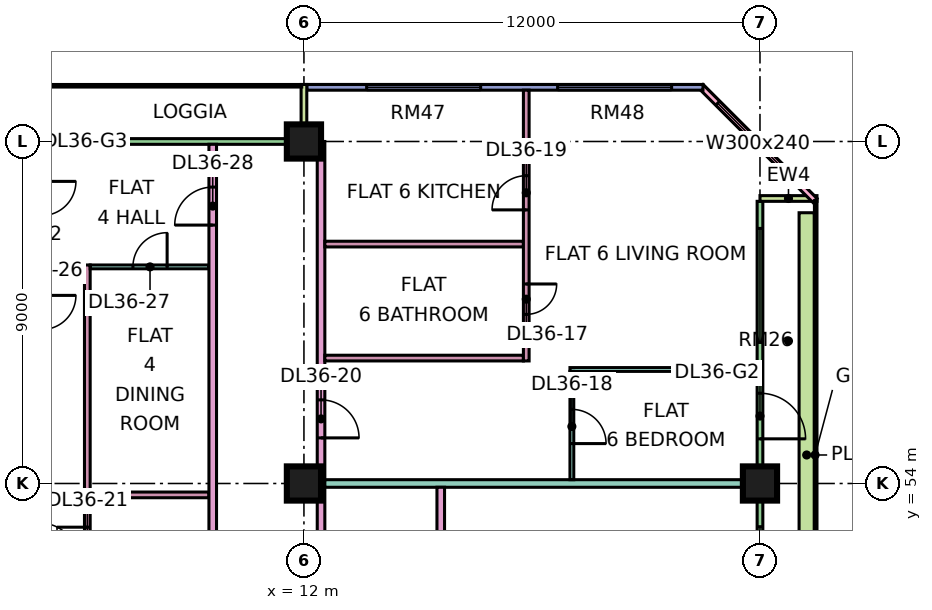
"""IFC4 building model, lengths in metres.
Left out: names, types, materials, properties, quantities, classifications, styles, units other than length and angle.
Written with IfcOpenShell. Run it as: python <this file> out.ifc"""

import sys

from ifc_helpers import new_model, si_unit, direction, frame, frame_2d, origin, origin_2d, place, context, subcontext, project, spatial, rectangle, extrude, element, fill, save


model = new_model("IFC4")
c1 = context("Model", 3, precision=1e-05, world=origin(), true_north=direction((0.0, 1.0)))
c2 = subcontext(c1, "Body", "Model", "MODEL_VIEW")
j1 = project(units=[si_unit("LENGTHUNIT", "METRE"), si_unit("PLANEANGLEUNIT", "RADIAN")], contexts=[c1])
p1 = place(None, origin())
s1 = spatial("IfcSite", under=j1, at=p1, CompositionType="ELEMENT")
p2 = place(p1, origin())
s2 = spatial("IfcBuilding", under=s1, at=p2, CompositionType="ELEMENT")
p3 = place(p2, frame((0.0, 0.0, 161.15)))
s3 = spatial("IfcBuildingStorey", under=s2, at=p3, CompositionType="ELEMENT", Elevation=161.15)
for number, where, z_axis, x_axis in (
    (1, (12.0, 54.0, 0.0), (0.0, 0.0, 1.0), (1.0, 0.0, 0.0)),
    (2, (12.0, 63.0, 0.0), (0.0, 0.0, 1.0), (1.0, 0.0, 0.0)),
    (3, (24.0, 54.0, 0.0), (0.0, 0.0, 1.0), (1.0, 0.0, 0.0)),
):
    element("IfcColumn", number, at=place(p3, frame(where, z_axis=z_axis, x_axis=x_axis)), inside=s3, PredefinedType="COLUMN", context=c2, shape_type="SweptSolid", body=[
        extrude(rectangle(XDim=0.9, YDim=0.9, at=origin_2d()), origin(), (0.0, 0.0, 1.0), 3.75),
    ])
p4 = place(p3, frame((24.0, 48.075, 0.0), z_axis=(0.0, 0.0, 1.0), x_axis=(0.0, 1.0, 0.0)))
e4 = element("IfcWall", 4, at=p4, inside=s3, PredefinedType="SOLIDWALL", context=c2, shape_type="SweptSolid", body=[
    extrude(rectangle(XDim=13.35, YDim=0.15, at=frame_2d((6.675, 0.0))), origin(), (0.0, 0.0, 1.0), 3.35),
])
p5 = place(p4, frame((0.587, 0.0, 0.45)))
e5 = element("IfcOpeningElement", 5, at=p5, cuts=e4, PredefinedType="OPENING", context=c2, shape_type="SweptSolid", body=[
    extrude(rectangle(XDim=4.2, YDim=2.4, at=frame_2d((2.1, 1.2))), frame((0.0, 0.085, 0.0), z_axis=(0.0, -1.0, 0.0), x_axis=(1.0, 0.0, 0.0)), (0.0, 0.0, 1.0), 0.17),
])
p6 = place(p4, frame((7.1, 0.0, 0.0)))
e6 = element("IfcOpeningElement", 6, at=p6, cuts=e4, PredefinedType="OPENING", context=c2, shape_type="SweptSolid", body=[
    extrude(rectangle(XDim=1.2, YDim=2.4, at=frame_2d((0.6, 1.2))), frame((0.0, 0.085, 0.0), z_axis=(0.0, -1.0, 0.0), x_axis=(1.0, 0.0, 0.0)), (0.0, 0.0, 1.0), 0.17),
])
p7 = place(p4, frame((9.637, 0.0, 0.45)))
e7 = element("IfcOpeningElement", 7, at=p7, cuts=e4, PredefinedType="OPENING", context=c2, shape_type="SweptSolid", body=[
    extrude(rectangle(XDim=3.0, YDim=2.4, at=frame_2d((1.5, 1.2))), frame((0.0, 0.085, 0.0), z_axis=(0.0, -1.0, 0.0), x_axis=(1.0, 0.0, 0.0)), (0.0, 0.0, 1.0), 0.17),
])
p8 = place(p3, frame((25.5, 61.5, 0.0), z_axis=(0.0, 0.0, 1.0), x_axis=(-1.0, 0.0, 0.0)))
e8 = element("IfcWall", 8, at=p8, inside=s3, PredefinedType="SOLIDWALL", context=c2, shape_type="SweptSolid", body=[
    extrude(rectangle(XDim=1.5, YDim=0.15, at=frame_2d((0.75, 0.0))), origin(), (0.0, 0.0, 1.0), 3.35),
])
p9 = place(p3, frame((25.447, 61.447, 0.0), z_axis=(0.0, 0.0, 1.0), x_axis=(-0.707106781187, 0.707106781187, 0.0)))
e9 = element("IfcWall", 9, at=p9, inside=s3, PredefinedType="SOLIDWALL", context=c2, shape_type="SweptSolid", body=[
    extrude(rectangle(XDim=4.243, YDim=0.15, at=frame_2d((2.121, 0.0))), origin(), (0.0, 0.0, 1.0), 3.35),
])
p10 = place(p9, frame((0.621, 0.0, 0.45)))
e10 = element("IfcOpeningElement", 10, at=p10, cuts=e9, PredefinedType="OPENING", context=c2, shape_type="SweptSolid", body=[
    extrude(rectangle(XDim=3.0, YDim=2.4, at=frame_2d((1.5, 1.2))), frame((0.0, 0.085, 0.0), z_axis=(0.0, -1.0, 0.0), x_axis=(1.0, 0.0, 0.0)), (0.0, 0.0, 1.0), 0.17),
])
p11 = place(p3, frame((22.5, 64.425, 0.0), z_axis=(0.0, 0.0, 1.0), x_axis=(-1.0, 0.0, 0.0)))
e11 = element("IfcWall", 11, at=p11, inside=s3, PredefinedType="SOLIDWALL", context=c2, shape_type="SweptSolid", body=[
    extrude(rectangle(XDim=10.425, YDim=0.15, at=frame_2d((5.212, 0.0))), origin(), (0.0, 0.0, 1.0), 3.35),
])
p12 = place(p11, frame((0.825, 0.0, 0.45)))
e12 = element("IfcOpeningElement", 12, at=p12, cuts=e11, PredefinedType="OPENING", context=c2, shape_type="SweptSolid", body=[
    extrude(rectangle(XDim=3.0, YDim=2.4, at=frame_2d((1.5, 1.2))), frame((0.0, 0.085, 0.0), z_axis=(0.0, -1.0, 0.0), x_axis=(1.0, 0.0, 0.0)), (0.0, 0.0, 1.0), 0.17),
])
p13 = place(p11, frame((5.85, 0.0, 0.45)))
e13 = element("IfcOpeningElement", 13, at=p13, cuts=e11, PredefinedType="OPENING", context=c2, shape_type="SweptSolid", body=[
    extrude(rectangle(XDim=3.0, YDim=2.4, at=frame_2d((1.5, 1.2))), frame((0.0, 0.085, 0.0), z_axis=(0.0, -1.0, 0.0), x_axis=(1.0, 0.0, 0.0)), (0.0, 0.0, 1.0), 0.17),
])
p14 = place(p3, frame((11.925, 63.0, 0.0), z_axis=(0.0, 0.0, 1.0), x_axis=(-1.0, 0.0, 0.0)))
e14 = element("IfcWall", 14, at=p14, inside=s3, PredefinedType="SOLIDWALL", context=c2, shape_type="SweptSolid", body=[
    extrude(rectangle(XDim=10.35, YDim=0.15, at=frame_2d((5.175, 0.0))), origin(), (0.0, 0.0, 1.0), 3.35),
])
p15 = place(p14, frame((7.688, 0.0, 0.0)))
e15 = element("IfcOpeningElement", 15, at=p15, cuts=e14, PredefinedType="OPENING", context=c2, shape_type="SweptSolid", body=[
    extrude(rectangle(XDim=1.8, YDim=2.4, at=frame_2d((0.9, 1.2))), frame((0.0, 0.085, 0.0), z_axis=(0.0, -1.0, 0.0), x_axis=(1.0, 0.0, 0.0)), (0.0, 0.0, 1.0), 0.17),
])
p16 = place(p3, frame((12.0, 64.5, 0.0), z_axis=(0.0, 0.0, 1.0), x_axis=(0.0, -1.0, 0.0)))
e16 = element("IfcWall", 16, at=p16, inside=s3, PredefinedType="SOLIDWALL", context=c2, shape_type="SweptSolid", body=[
    extrude(rectangle(XDim=1.5, YDim=0.15, at=frame_2d((0.75, 0.0))), origin(), (0.0, 0.0, 1.0), 3.35),
])
p17 = place(p3, frame((25.229, 48.375, 0.0), z_axis=(0.0, 0.0, 1.0), x_axis=(0.0, 1.0, 0.0)))
e17 = element("IfcWall", 17, at=p17, inside=s3, PredefinedType="SOLIDWALL", context=c2, shape_type="SweptSolid", body=[
    extrude(rectangle(XDim=12.75, YDim=0.4, at=frame_2d((6.375, 0.0))), origin(), (0.0, 0.0, 1.0), 0.7),
])
p18 = place(p3, frame((6.3, 36.1, 0.0), z_axis=(0.0, 0.0, 1.0), x_axis=(0.0, 1.0, 0.0)))
e18 = element("IfcWall", 18, at=p18, inside=s3, PredefinedType="PARTITIONING", context=c2, shape_type="SweptSolid", body=[
    extrude(rectangle(XDim=23.65, YDim=0.15, at=frame_2d((11.825, 0.0))), origin(), (0.0, 0.0, 1.0), 3.35),
])
p19 = place(p18, frame((15.95, 0.0, 0.0)))
e19 = element("IfcOpeningElement", 19, at=p19, cuts=e18, PredefinedType="OPENING", context=c2, shape_type="SweptSolid", body=[
    extrude(rectangle(XDim=0.8, YDim=2.1, at=frame_2d((0.4, 1.05))), frame((0.0, 0.085, 0.0), z_axis=(0.0, -1.0, 0.0), x_axis=(1.0, 0.0, 0.0)), (0.0, 0.0, 1.0), 0.17),
])
p20 = place(p18, frame((5.75, 0.0, 0.0)))
e20 = element("IfcOpeningElement", 20, at=p20, cuts=e18, PredefinedType="OPENING", context=c2, shape_type="SweptSolid", body=[
    extrude(rectangle(XDim=0.9, YDim=2.1, at=frame_2d((0.45, 1.05))), frame((0.0, 0.085, 0.0), z_axis=(0.0, -1.0, 0.0), x_axis=(1.0, 0.0, 0.0)), (0.0, 0.0, 1.0), 0.17),
])
p21 = place(p18, frame((0.95, 0.0, 0.0)))
e21 = element("IfcOpeningElement", 21, at=p21, cuts=e18, PredefinedType="OPENING", context=c2, shape_type="SweptSolid", body=[
    extrude(rectangle(XDim=0.8, YDim=2.1, at=frame_2d((0.4, 1.05))), frame((0.0, 0.085, 0.0), z_axis=(0.0, -1.0, 0.0), x_axis=(1.0, 0.0, 0.0)), (0.0, 0.0, 1.0), 0.17),
])
p22 = place(p18, frame((10.55, 0.0, 0.0)))
e22 = element("IfcOpeningElement", 22, at=p22, cuts=e18, PredefinedType="OPENING", context=c2, shape_type="SweptSolid", body=[
    extrude(rectangle(XDim=0.8, YDim=2.1, at=frame_2d((0.4, 1.05))), frame((0.0, 0.085, 0.0), z_axis=(0.0, -1.0, 0.0), x_axis=(1.0, 0.0, 0.0)), (0.0, 0.0, 1.0), 0.17),
])
p23 = place(p18, frame((13.4, 0.0, 0.0)))
e23 = element("IfcOpeningElement", 23, at=p23, cuts=e18, PredefinedType="OPENING", context=c2, shape_type="SweptSolid", body=[
    extrude(rectangle(XDim=0.8, YDim=2.1, at=frame_2d((0.4, 1.05))), frame((0.0, 0.085, 0.0), z_axis=(0.0, -1.0, 0.0), x_axis=(1.0, 0.0, 0.0)), (0.0, 0.0, 1.0), 0.17),
])
p24 = place(p3, frame((6.375, 53.7, 0.0), z_axis=(0.0, 0.0, 1.0), x_axis=(1.0, 0.0, 0.0)))
e24 = element("IfcWall", 24, at=p24, inside=s3, PredefinedType="PARTITIONING", context=c2, shape_type="SweptSolid", body=[
    extrude(rectangle(XDim=3.125, YDim=0.15, at=frame_2d((1.562, 0.0))), origin(), (0.0, 0.0, 1.0), 3.35),
])
p25 = place(p3, frame((6.375, 59.7, 0.0), z_axis=(0.0, 0.0, 1.0), x_axis=(1.0, 0.0, 0.0)))
e25 = element("IfcWall", 25, at=p25, inside=s3, PredefinedType="PARTITIONING", context=c2, shape_type="SweptSolid", body=[
    extrude(rectangle(XDim=3.125, YDim=0.1, at=frame_2d((1.562, 0.0))), origin(), (0.0, 0.0, 1.0), 3.35),
])
p26 = place(p25, frame((1.125, 0.0, 0.0)))
e26 = element("IfcOpeningElement", 26, at=p26, cuts=e25, PredefinedType="OPENING", context=c2, shape_type="SweptSolid", body=[
    extrude(rectangle(XDim=0.9, YDim=2.1, at=frame_2d((0.45, 1.05))), frame((0.0, 0.06, 0.0), z_axis=(0.0, -1.0, 0.0), x_axis=(1.0, 0.0, 0.0)), (0.0, 0.0, 1.0), 0.12),
])
p27 = place(p3, frame((9.6, 20.0, 0.0), z_axis=(0.0, 0.0, 1.0), x_axis=(0.0, 1.0, 0.0)))
e27 = element("IfcWall", 27, at=p27, inside=s3, PredefinedType="PARTITIONING", context=c2, shape_type="SweptSolid", body=[
    extrude(rectangle(XDim=42.926, YDim=0.2, at=frame_2d((21.463, 0.0))), origin(), (0.0, 0.0, 1.0), 3.35),
])
p28 = place(p27, frame((40.8, 0.0, 0.0)))
e28 = element("IfcOpeningElement", 28, at=p28, cuts=e27, PredefinedType="OPENING", context=c2, shape_type="SweptSolid", body=[
    extrude(rectangle(XDim=1.0, YDim=2.1, at=frame_2d((0.5, 1.05))), frame((0.0, 0.11, 0.0), z_axis=(0.0, -1.0, 0.0), x_axis=(1.0, 0.0, 0.0)), (0.0, 0.0, 1.0), 0.22),
])
p29 = place(p27, frame((0.6, 0.0, 0.0)))
e29 = element("IfcOpeningElement", 29, at=p29, cuts=e27, PredefinedType="OPENING", context=c2, shape_type="SweptSolid", body=[
    extrude(rectangle(XDim=1.2, YDim=2.1, at=frame_2d((0.6, 1.05))), frame((0.0, 0.11, 0.0), z_axis=(0.0, -1.0, 0.0), x_axis=(1.0, 0.0, 0.0)), (0.0, 0.0, 1.0), 0.22),
])
p30 = place(p27, frame((3.9, 0.0, 0.0)))
e30 = element("IfcOpeningElement", 30, at=p30, cuts=e27, PredefinedType="OPENING", context=c2, shape_type="SweptSolid", body=[
    extrude(rectangle(XDim=1.0, YDim=2.1, at=frame_2d((0.5, 1.05))), frame((0.0, 0.11, 0.0), z_axis=(0.0, -1.0, 0.0), x_axis=(1.0, 0.0, 0.0)), (0.0, 0.0, 1.0), 0.22),
])
p31 = place(p3, frame((12.45, 20.0, 0.0), z_axis=(0.0, 0.0, 1.0), x_axis=(0.0, 1.0, 0.0)))
e31 = element("IfcWall", 31, at=p31, inside=s3, PredefinedType="PARTITIONING", context=c2, shape_type="SweptSolid", body=[
    extrude(rectangle(XDim=43.0, YDim=0.2, at=frame_2d((21.5, 0.0))), origin(), (0.0, 0.0, 1.0), 3.35),
])
p32 = place(p31, frame((5.95, 0.0, 0.0)))
e32 = element("IfcOpeningElement", 32, at=p32, cuts=e31, PredefinedType="OPENING", context=c2, shape_type="SweptSolid", body=[
    extrude(rectangle(XDim=1.0, YDim=2.1, at=frame_2d((0.5, 1.05))), frame((0.0, 0.11, 0.0), z_axis=(0.0, -1.0, 0.0), x_axis=(1.0, 0.0, 0.0)), (0.0, 0.0, 1.0), 0.22),
])
p33 = place(p31, frame((12.0, 0.0, 0.0)))
e33 = element("IfcOpeningElement", 33, at=p33, cuts=e31, PredefinedType="OPENING", context=c2, shape_type="SweptSolid", body=[
    extrude(rectangle(XDim=1.0, YDim=2.1, at=frame_2d((0.5, 1.05))), frame((0.0, 0.11, 0.0), z_axis=(0.0, -1.0, 0.0), x_axis=(1.0, 0.0, 0.0)), (0.0, 0.0, 1.0), 0.22),
])
p34 = place(p31, frame((23.35, 0.0, 0.0)))
e34 = element("IfcOpeningElement", 34, at=p34, cuts=e31, PredefinedType="OPENING", context=c2, shape_type="SweptSolid", body=[
    extrude(rectangle(XDim=1.0, YDim=2.1, at=frame_2d((0.5, 1.05))), frame((0.0, 0.11, 0.0), z_axis=(0.0, -1.0, 0.0), x_axis=(1.0, 0.0, 0.0)), (0.0, 0.0, 1.0), 0.22),
])
p35 = place(p31, frame((35.2, 0.0, 0.0)))
e35 = element("IfcOpeningElement", 35, at=p35, cuts=e31, PredefinedType="OPENING", context=c2, shape_type="SweptSolid", body=[
    extrude(rectangle(XDim=1.0, YDim=2.1, at=frame_2d((0.5, 1.05))), frame((0.0, 0.11, 0.0), z_axis=(0.0, -1.0, 0.0), x_axis=(1.0, 0.0, 0.0)), (0.0, 0.0, 1.0), 0.22),
])
p36 = place(p31, frame((1.15, 0.0, 0.0)))
e36 = element("IfcOpeningElement", 36, at=p36, cuts=e31, PredefinedType="OPENING", context=c2, shape_type="SweptSolid", body=[
    extrude(rectangle(XDim=1.8, YDim=2.1, at=frame_2d((0.9, 1.05))), frame((0.0, 0.11, 0.0), z_axis=(0.0, -1.0, 0.0), x_axis=(1.0, 0.0, 0.0)), (0.0, 0.0, 1.0), 0.22),
])
p37 = place(p31, frame((28.6, 0.0, 0.0)))
e37 = element("IfcOpeningElement", 37, at=p37, cuts=e31, PredefinedType="OPENING", context=c2, shape_type="SweptSolid", body=[
    extrude(rectangle(XDim=1.8, YDim=2.1, at=frame_2d((0.9, 1.05))), frame((0.0, 0.11, 0.0), z_axis=(0.0, -1.0, 0.0), x_axis=(1.0, 0.0, 0.0)), (0.0, 0.0, 1.0), 0.22),
])
p38 = place(p3, frame((12.55, 54.0, 0.0), z_axis=(0.0, 0.0, 1.0), x_axis=(1.0, 0.0, 0.0)))
e38 = element("IfcWall", 38, at=p38, inside=s3, PredefinedType="PARTITIONING", context=c2, shape_type="SweptSolid", body=[
    extrude(rectangle(XDim=11.376, YDim=0.2, at=frame_2d((5.688, 0.0))), origin(), (0.0, 0.0, 1.0), 3.35),
])
for number, where, z_axis, x_axis in (
    (39, (12.55, 57.3, 0.0), (0.0, 0.0, 1.0), (1.0, 0.0, 0.0)),
    (40, (12.55, 60.3, 0.0), (0.0, 0.0, 1.0), (1.0, 0.0, 0.0)),
):
    element("IfcWall", number, at=place(p3, frame(where, z_axis=z_axis, x_axis=x_axis)), inside=s3, PredefinedType="PARTITIONING", context=c2, shape_type="SweptSolid", body=[
        extrude(rectangle(XDim=5.225, YDim=0.15, at=frame_2d((2.612, 0.0))), origin(), (0.0, 0.0, 1.0), 3.35),
    ])
p39 = place(p3, frame((15.6, 51.225, 0.0), z_axis=(0.0, 0.0, 1.0), x_axis=(0.0, 1.0, 0.0)))
e41 = element("IfcWall", 41, at=p39, inside=s3, PredefinedType="PARTITIONING", context=c2, shape_type="SweptSolid", body=[
    extrude(rectangle(XDim=2.675, YDim=0.2, at=frame_2d((1.337, 0.0))), origin(), (0.0, 0.0, 1.0), 3.35),
])
p40 = place(p3, frame((17.85, 57.225, 0.0), z_axis=(0.0, 0.0, 1.0), x_axis=(0.0, 1.0, 0.0)))
e42 = element("IfcWall", 42, at=p40, inside=s3, PredefinedType="PARTITIONING", context=c2, shape_type="SweptSolid", body=[
    extrude(rectangle(XDim=7.125, YDim=0.15, at=frame_2d((3.562, 0.0))), origin(), (0.0, 0.0, 1.0), 3.35),
])
p41 = place(p40, frame((1.225, 0.0, 0.0)))
e43 = element("IfcOpeningElement", 43, at=p41, cuts=e42, PredefinedType="OPENING", context=c2, shape_type="SweptSolid", body=[
    extrude(rectangle(XDim=0.8, YDim=2.1, at=frame_2d((0.4, 1.05))), frame((0.0, 0.085, 0.0), z_axis=(0.0, -1.0, 0.0), x_axis=(1.0, 0.0, 0.0)), (0.0, 0.0, 1.0), 0.17),
])
p42 = place(p40, frame((3.975, 0.0, 0.0)))
e44 = element("IfcOpeningElement", 44, at=p42, cuts=e42, PredefinedType="OPENING", context=c2, shape_type="SweptSolid", body=[
    extrude(rectangle(XDim=0.9, YDim=2.1, at=frame_2d((0.45, 1.05))), frame((0.0, 0.085, 0.0), z_axis=(0.0, -1.0, 0.0), x_axis=(1.0, 0.0, 0.0)), (0.0, 0.0, 1.0), 0.17),
])
p43 = place(p3, frame((19.0, 57.0, 0.0), z_axis=(0.0, 0.0, 1.0), x_axis=(1.0, 0.0, 0.0)))
e45 = element("IfcWall", 45, at=p43, inside=s3, PredefinedType="PARTITIONING", context=c2, shape_type="SweptSolid", body=[
    extrude(rectangle(XDim=4.926, YDim=0.1, at=frame_2d((2.463, 0.0))), origin(), (0.0, 0.0, 1.0), 3.35),
])
p44 = place(p3, frame((19.05, 54.1, 0.0), z_axis=(0.0, 0.0, 1.0), x_axis=(0.0, 1.0, 0.0)))
e46 = element("IfcWall", 46, at=p44, inside=s3, PredefinedType="PARTITIONING", context=c2, shape_type="SweptSolid", body=[
    extrude(rectangle(XDim=2.85, YDim=0.1, at=frame_2d((1.425, 0.0))), origin(), (0.0, 0.0, 1.0), 3.35),
])
p45 = place(p44, frame((0.95, 0.0, 0.0)))
e47 = element("IfcOpeningElement", 47, at=p45, cuts=e46, PredefinedType="OPENING", context=c2, shape_type="SweptSolid", body=[
    extrude(rectangle(XDim=0.9, YDim=2.1, at=frame_2d((0.45, 1.05))), frame((0.0, 0.06, 0.0), z_axis=(0.0, -1.0, 0.0), x_axis=(1.0, 0.0, 0.0)), (0.0, 0.0, 1.0), 0.12),
])
p46 = place(p5, origin())
e48 = element("IfcWindow", 48, at=p46, inside=s3, PartitioningType="SINGLE_PANEL", PredefinedType="WINDOW", context=c2, shape_type="SweptSolid", body=[
    extrude(rectangle(XDim=4.2, YDim=2.4, at=frame_2d((2.1, 1.2))), frame((0.0, 0.03, 0.0), z_axis=(0.0, -1.0, 0.0), x_axis=(1.0, 0.0, 0.0)), (0.0, 0.0, 1.0), 0.06),
])
fill(e5, e48)
p47 = place(p6, frame((1.2, 0.0, 0.0), z_axis=(0.0, 0.0, 1.0), x_axis=(-1.0, 0.0, 0.0)))
e49 = element("IfcDoor", 49, at=p47, inside=s3, OperationType="DOUBLE_DOOR_SINGLE_SWING", PredefinedType="DOOR", context=c2, shape_type="SweptSolid", body=[
    extrude(rectangle(XDim=1.2, YDim=2.4, at=frame_2d((0.6, 1.2))), frame((0.0, 0.025, 0.0), z_axis=(0.0, -1.0, 0.0), x_axis=(1.0, 0.0, 0.0)), (0.0, 0.0, 1.0), 0.05),
])
fill(e6, e49)
p48 = place(p7, origin())
e50 = element("IfcWindow", 50, at=p48, inside=s3, PartitioningType="SINGLE_PANEL", PredefinedType="WINDOW", context=c2, shape_type="SweptSolid", body=[
    extrude(rectangle(XDim=3.0, YDim=2.4, at=frame_2d((1.5, 1.2))), frame((0.0, 0.03, 0.0), z_axis=(0.0, -1.0, 0.0), x_axis=(1.0, 0.0, 0.0)), (0.0, 0.0, 1.0), 0.06),
])
fill(e7, e50)
p49 = place(p10, origin())
e51 = element("IfcWindow", 51, at=p49, inside=s3, PartitioningType="SINGLE_PANEL", PredefinedType="WINDOW", context=c2, shape_type="SweptSolid", body=[
    extrude(rectangle(XDim=3.0, YDim=2.4, at=frame_2d((1.5, 1.2))), frame((0.0, 0.03, 0.0), z_axis=(0.0, -1.0, 0.0), x_axis=(1.0, 0.0, 0.0)), (0.0, 0.0, 1.0), 0.06),
])
fill(e10, e51)
p50 = place(p12, origin())
e52 = element("IfcWindow", 52, at=p50, inside=s3, PartitioningType="SINGLE_PANEL", PredefinedType="WINDOW", context=c2, shape_type="SweptSolid", body=[
    extrude(rectangle(XDim=3.0, YDim=2.4, at=frame_2d((1.5, 1.2))), frame((0.0, 0.03, 0.0), z_axis=(0.0, -1.0, 0.0), x_axis=(1.0, 0.0, 0.0)), (0.0, 0.0, 1.0), 0.06),
])
fill(e12, e52)
p51 = place(p13, origin())
e53 = element("IfcWindow", 53, at=p51, inside=s3, PartitioningType="SINGLE_PANEL", PredefinedType="WINDOW", context=c2, shape_type="SweptSolid", body=[
    extrude(rectangle(XDim=3.0, YDim=2.4, at=frame_2d((1.5, 1.2))), frame((0.0, 0.03, 0.0), z_axis=(0.0, -1.0, 0.0), x_axis=(1.0, 0.0, 0.0)), (0.0, 0.0, 1.0), 0.06),
])
fill(e13, e53)
p52 = place(p41, origin())
e54 = element("IfcDoor", 54, at=p52, inside=s3, OperationType="SINGLE_SWING_RIGHT", PredefinedType="DOOR", context=c2, shape_type="SweptSolid", body=[
    extrude(rectangle(XDim=0.8, YDim=2.1, at=frame_2d((0.4, 1.05))), frame((0.0, 0.025, 0.0), z_axis=(0.0, -1.0, 0.0), x_axis=(1.0, 0.0, 0.0)), (0.0, 0.0, 1.0), 0.05),
])
fill(e43, e54)
p53 = place(p45, frame((0.9, 0.0, 0.0), z_axis=(0.0, 0.0, 1.0), x_axis=(-1.0, 0.0, 0.0)))
e55 = element("IfcDoor", 55, at=p53, inside=s3, OperationType="SINGLE_SWING_LEFT", PredefinedType="DOOR", context=c2, shape_type="SweptSolid", body=[
    extrude(rectangle(XDim=0.9, YDim=2.1, at=frame_2d((0.45, 1.05))), frame((0.0, 0.025, 0.0), z_axis=(0.0, -1.0, 0.0), x_axis=(1.0, 0.0, 0.0)), (0.0, 0.0, 1.0), 0.05),
])
fill(e47, e55)
p54 = place(p42, origin())
e56 = element("IfcDoor", 56, at=p54, inside=s3, OperationType="SINGLE_SWING_LEFT", PredefinedType="DOOR", context=c2, shape_type="SweptSolid", body=[
    extrude(rectangle(XDim=0.9, YDim=2.1, at=frame_2d((0.45, 1.05))), frame((0.0, 0.025, 0.0), z_axis=(0.0, -1.0, 0.0), x_axis=(1.0, 0.0, 0.0)), (0.0, 0.0, 1.0), 0.05),
])
fill(e44, e56)
p55 = place(p35, frame((1.0, 0.0, 0.0), z_axis=(0.0, 0.0, 1.0), x_axis=(-1.0, 0.0, 0.0)))
e57 = element("IfcDoor", 57, at=p55, inside=s3, OperationType="SINGLE_SWING_LEFT", PredefinedType="DOOR", context=c2, shape_type="SweptSolid", body=[
    extrude(rectangle(XDim=1.0, YDim=2.1, at=frame_2d((0.5, 1.05))), frame((0.0, 0.025, 0.0), z_axis=(0.0, -1.0, 0.0), x_axis=(1.0, 0.0, 0.0)), (0.0, 0.0, 1.0), 0.05),
])
fill(e35, e57)
p56 = place(p19, frame((0.8, 0.0, 0.0), z_axis=(0.0, 0.0, 1.0), x_axis=(-1.0, 0.0, 0.0)))
e58 = element("IfcDoor", 58, at=p56, inside=s3, OperationType="SINGLE_SWING_RIGHT", PredefinedType="DOOR", context=c2, shape_type="SweptSolid", body=[
    extrude(rectangle(XDim=0.8, YDim=2.1, at=frame_2d((0.4, 1.05))), frame((0.0, 0.025, 0.0), z_axis=(0.0, -1.0, 0.0), x_axis=(1.0, 0.0, 0.0)), (0.0, 0.0, 1.0), 0.05),
])
fill(e19, e58)
p57 = place(p26, frame((0.9, 0.0, 0.0), z_axis=(0.0, 0.0, 1.0), x_axis=(-1.0, 0.0, 0.0)))
e59 = element("IfcDoor", 59, at=p57, inside=s3, OperationType="SINGLE_SWING_RIGHT", PredefinedType="DOOR", context=c2, shape_type="SweptSolid", body=[
    extrude(rectangle(XDim=0.9, YDim=2.1, at=frame_2d((0.45, 1.05))), frame((0.0, 0.025, 0.0), z_axis=(0.0, -1.0, 0.0), x_axis=(1.0, 0.0, 0.0)), (0.0, 0.0, 1.0), 0.05),
])
fill(e26, e59)
p58 = place(p28, origin())
e60 = element("IfcDoor", 60, at=p58, inside=s3, OperationType="SINGLE_SWING_LEFT", PredefinedType="DOOR", context=c2, shape_type="SweptSolid", body=[
    extrude(rectangle(XDim=1.0, YDim=2.1, at=frame_2d((0.5, 1.05))), frame((0.0, 0.025, 0.0), z_axis=(0.0, -1.0, 0.0), x_axis=(1.0, 0.0, 0.0)), (0.0, 0.0, 1.0), 0.05),
])
fill(e28, e60)
save(model, sys.argv[1])
